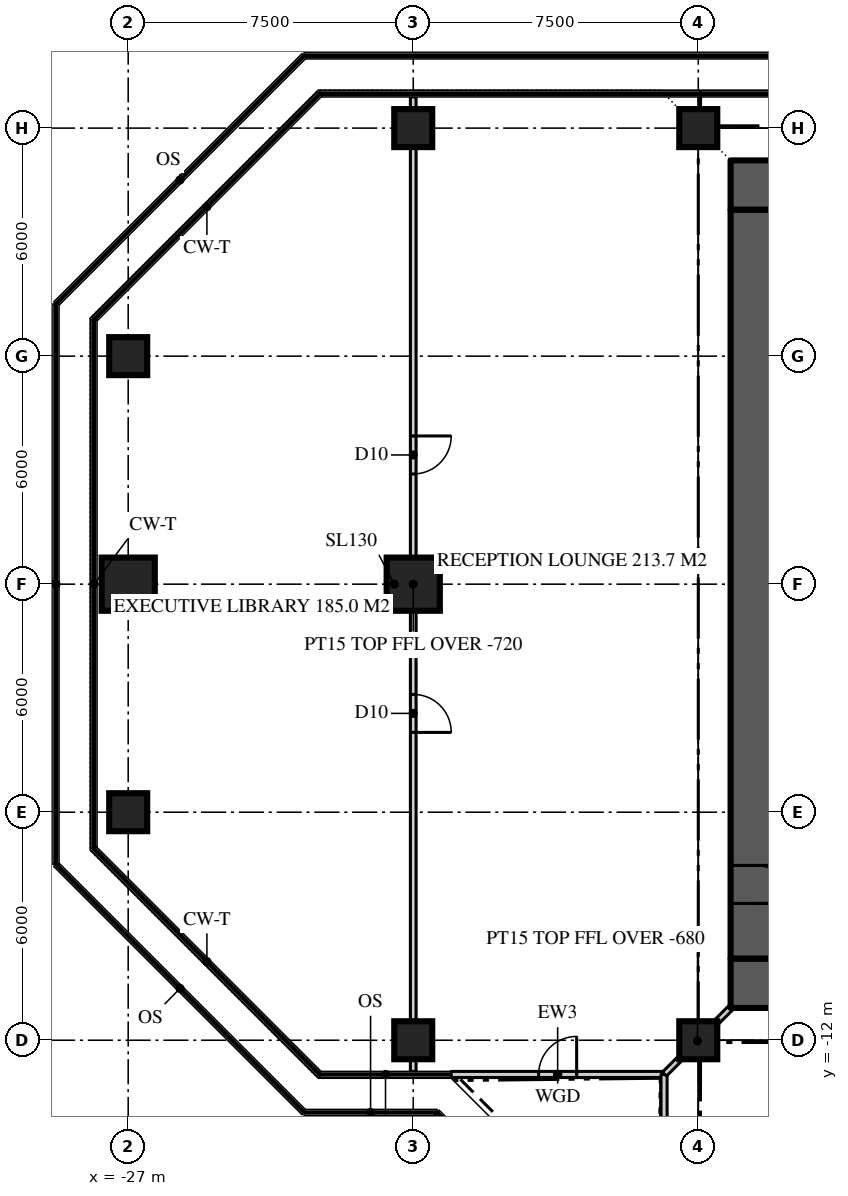
"""IFC4 building model, lengths in metres.
Left out: names, types, materials, properties, quantities, classifications, styles, units other than length and angle.
Written with IfcOpenShell. Run it as: python <this file> out.ifc"""

import sys

from ifc_helpers import new_model, si_unit, direction, frame, frame_2d, origin, origin_2d, place, context, subcontext, project, spatial, rectangle, extrude, element, fill, save


model = new_model("IFC4")
c1 = context("Model", 3, precision=1e-05, world=origin(), true_north=direction((0.0, 1.0)))
c2 = subcontext(c1, "Body", "Model", "MODEL_VIEW")
j1 = project(units=[si_unit("LENGTHUNIT", "METRE"), si_unit("PLANEANGLEUNIT", "RADIAN")], contexts=[c1])
p1 = place(None, origin())
s1 = spatial("IfcSite", under=j1, at=p1, CompositionType="ELEMENT")
p2 = place(p1, origin())
s2 = spatial("IfcBuilding", under=s1, at=p2, CompositionType="ELEMENT")
p3 = place(p2, frame((0.0, 0.0, 298.5)))
s3 = spatial("IfcBuildingStorey", under=s2, at=p3, CompositionType="ELEMENT", Elevation=298.5)
p4 = place(p3, frame((-11.15, 10.5, 0.0), z_axis=(0.0, 0.0, 1.0), x_axis=(1.0, 0.0, 0.0)))
e1 = element("IfcWall", 1, at=p4, inside=s3, PredefinedType="SHEAR", context=c2, shape_type="SweptSolid", body=[
    extrude(rectangle(XDim=22.3, YDim=1.3, at=frame_2d((11.15, 0.0))), origin(), (0.0, 0.0, 1.0), 3.9),
])
p5 = place(p4, frame((4.25, 0.0, 0.0)))
e2 = element("IfcOpeningElement", 2, at=p5, cuts=e1, PredefinedType="OPENING", context=c2, shape_type="SweptSolid", body=[
    extrude(rectangle(XDim=1.8, YDim=2.2, at=frame_2d((0.9, 1.1))), frame((0.0, 0.66, 0.0), z_axis=(0.0, -1.0, 0.0), x_axis=(1.0, 0.0, 0.0)), (0.0, 0.0, 1.0), 1.32),
])
p6 = place(p4, frame((16.25, 0.0, 0.0)))
e3 = element("IfcOpeningElement", 3, at=p6, cuts=e1, PredefinedType="OPENING", context=c2, shape_type="SweptSolid", body=[
    extrude(rectangle(XDim=1.8, YDim=2.2, at=frame_2d((0.9, 1.1))), frame((0.0, 0.66, 0.0), z_axis=(0.0, -1.0, 0.0), x_axis=(1.0, 0.0, 0.0)), (0.0, 0.0, 1.0), 1.32),
])
p7 = place(p3, frame((11.15, -10.5, 0.0), z_axis=(0.0, 0.0, 1.0), x_axis=(-1.0, 0.0, 0.0)))
e4 = element("IfcWall", 4, at=p7, inside=s3, PredefinedType="SHEAR", context=c2, shape_type="SweptSolid", body=[
    extrude(rectangle(XDim=22.3, YDim=1.3, at=frame_2d((11.15, 0.0))), origin(), (0.0, 0.0, 1.0), 3.9),
])
p8 = place(p7, frame((16.25, 0.0, 0.0)))
e5 = element("IfcOpeningElement", 5, at=p8, cuts=e4, PredefinedType="OPENING", context=c2, shape_type="SweptSolid", body=[
    extrude(rectangle(XDim=1.8, YDim=2.2, at=frame_2d((0.9, 1.1))), frame((0.0, 0.66, 0.0), z_axis=(0.0, -1.0, 0.0), x_axis=(1.0, 0.0, 0.0)), (0.0, 0.0, 1.0), 1.32),
])
p9 = place(p7, frame((4.25, 0.0, 0.0)))
e6 = element("IfcOpeningElement", 6, at=p9, cuts=e4, PredefinedType="OPENING", context=c2, shape_type="SweptSolid", body=[
    extrude(rectangle(XDim=1.8, YDim=2.2, at=frame_2d((0.9, 1.1))), frame((0.0, 0.66, 0.0), z_axis=(0.0, -1.0, 0.0), x_axis=(1.0, 0.0, 0.0)), (0.0, 0.0, 1.0), 1.32),
])
p10 = place(p3, frame((-10.5, 9.85, 0.0), z_axis=(0.0, 0.0, 1.0), x_axis=(0.0, -1.0, 0.0)))
e7 = element("IfcWall", 7, at=p10, inside=s3, PredefinedType="SHEAR", context=c2, shape_type="SweptSolid", body=[
    extrude(rectangle(XDim=19.7, YDim=1.3, at=frame_2d((9.85, 0.0))), origin(), (0.0, 0.0, 1.0), 3.9),
])
p11 = place(p10, frame((17.25, 0.0, 0.0)))
e8 = element("IfcOpeningElement", 8, at=p11, cuts=e7, PredefinedType="OPENING", context=c2, shape_type="SweptSolid", body=[
    extrude(rectangle(XDim=1.0, YDim=2.2, at=frame_2d((0.5, 1.1))), frame((0.0, 0.66, 0.0), z_axis=(0.0, -1.0, 0.0), x_axis=(1.0, 0.0, 0.0)), (0.0, 0.0, 1.0), 1.32),
])
for number, where, z_axis, x_axis in (
    (9, (-19.5, -12.0, 0.0), (0.0, 0.0, 1.0), (1.0, 0.0, 0.0)),
    (10, (-12.0, -12.0, 0.0), (0.0, 0.0, 1.0), (1.0, 0.0, 0.0)),
    (11, (-27.0, -6.0, 0.0), (0.0, 0.0, 1.0), (1.0, 0.0, 0.0)),
):
    element("IfcColumn", number, at=place(p3, frame(where, z_axis=z_axis, x_axis=x_axis)), inside=s3, PredefinedType="COLUMN", context=c2, shape_type="SweptSolid", body=[
        extrude(rectangle(XDim=1.0, YDim=1.0, at=origin_2d()), origin(), (0.0, 0.0, 1.0), 3.9),
    ])
for number, where, z_axis, x_axis in (
    (12, (-27.0, 0.0, 0.0), (0.0, 0.0, 1.0), (1.0, 0.0, 0.0)),
    (13, (-19.5, 0.0, 0.0), (0.0, 0.0, 1.0), (1.0, 0.0, 0.0)),
):
    element("IfcColumn", number, at=place(p3, frame(where, z_axis=z_axis, x_axis=x_axis)), inside=s3, PredefinedType="COLUMN", context=c2, shape_type="SweptSolid", body=[
        extrude(rectangle(XDim=1.4, YDim=1.4, at=origin_2d()), origin(), (0.0, 0.0, 1.0), 3.9),
    ])
for number, where, z_axis, x_axis in (
    (14, (-27.0, 6.0, 0.0), (0.0, 0.0, 1.0), (1.0, 0.0, 0.0)),
    (15, (-19.5, 12.0, 0.0), (0.0, 0.0, 1.0), (1.0, 0.0, 0.0)),
    (16, (-12.0, 12.0, 0.0), (0.0, 0.0, 1.0), (1.0, 0.0, 0.0)),
):
    element("IfcColumn", number, at=place(p3, frame(where, z_axis=z_axis, x_axis=x_axis)), inside=s3, PredefinedType="COLUMN", context=c2, shape_type="SweptSolid", body=[
        extrude(rectangle(XDim=1.0, YDim=1.0, at=origin_2d()), origin(), (0.0, 0.0, 1.0), 3.9),
    ])
p12 = place(p3, frame((-18.5, -12.9, 0.0), z_axis=(0.0, 0.0, 1.0), x_axis=(1.0, 0.0, 0.0)))
e17 = element("IfcWall", 17, at=p12, inside=s3, PredefinedType="SOLIDWALL", context=c2, shape_type="SweptSolid", body=[
    extrude(rectangle(XDim=5.6, YDim=0.16, at=frame_2d((2.8, 0.0))), origin(), (0.0, 0.0, 1.0), 3.77),
])
p13 = place(p12, frame((2.3, 0.0, 0.0)))
e18 = element("IfcOpeningElement", 18, at=p13, cuts=e17, PredefinedType="OPENING", context=c2, shape_type="SweptSolid", body=[
    extrude(rectangle(XDim=1.0, YDim=2.2, at=frame_2d((0.5, 1.1))), frame((0.0, 0.09, 0.0), z_axis=(0.0, -1.0, 0.0), x_axis=(1.0, 0.0, 0.0)), (0.0, 0.0, 1.0), 0.18),
])
p14 = place(p3, frame((-12.9, -12.9, 0.0), z_axis=(0.0, 0.0, 1.0), x_axis=(0.0, -1.0, 0.0)))
e19 = element("IfcWall", 19, at=p14, inside=s3, PredefinedType="SOLIDWALL", context=c2, shape_type="SweptSolid", body=[
    extrude(rectangle(XDim=5.6, YDim=0.16, at=frame_2d((2.8, 0.0))), origin(), (0.0, 0.0, 1.0), 3.77),
])
p15 = place(p3, frame((-19.5, 12.82, 0.0), z_axis=(0.0, 0.0, 1.0), x_axis=(0.0, -1.0, 0.0)))
e20 = element("IfcWall", 20, at=p15, inside=s3, PredefinedType="PARTITIONING", context=c2, shape_type="SweptSolid", body=[
    extrude(rectangle(XDim=25.64, YDim=0.15, at=frame_2d((12.82, 0.0))), origin(), (0.0, 0.0, 1.0), 3.18),
])
p16 = place(p15, frame((15.72, 0.0, 0.0)))
e21 = element("IfcOpeningElement", 21, at=p16, cuts=e20, PredefinedType="OPENING", context=c2, shape_type="SweptSolid", body=[
    extrude(rectangle(XDim=1.0, YDim=2.2, at=frame_2d((0.5, 1.1))), frame((0.0, 0.085, 0.0), z_axis=(0.0, -1.0, 0.0), x_axis=(1.0, 0.0, 0.0)), (0.0, 0.0, 1.0), 0.17),
])
p17 = place(p15, frame((8.92, 0.0, 0.0)))
e22 = element("IfcOpeningElement", 22, at=p17, cuts=e20, PredefinedType="OPENING", context=c2, shape_type="SweptSolid", body=[
    extrude(rectangle(XDim=1.0, YDim=2.2, at=frame_2d((0.5, 1.1))), frame((0.0, 0.085, 0.0), z_axis=(0.0, -1.0, 0.0), x_axis=(1.0, 0.0, 0.0)), (0.0, 0.0, 1.0), 0.17),
])
p18 = place(p3, frame((-11.15, -11.15, 0.0), z_axis=(0.0, 0.0, 1.0), x_axis=(-0.707106781187, -0.707106781187, 0.0)))
e23 = element("IfcWall", 23, at=p18, inside=s3, PredefinedType="PARTITIONING", context=c2, shape_type="SweptSolid", body=[
    extrude(rectangle(XDim=2.461, YDim=0.15, at=frame_2d((1.23, 0.0))), origin(), (0.0, 0.0, 1.0), 3.22),
])
p19 = place(p13, origin())
e24 = element("IfcDoor", 24, at=p19, inside=s3, OperationType="SINGLE_SWING_RIGHT", PredefinedType="DOOR", context=c2, shape_type="SweptSolid", body=[
    extrude(rectangle(XDim=1.0, YDim=2.2, at=frame_2d((0.5, 1.1))), frame((0.0, 0.025, 0.0), z_axis=(0.0, -1.0, 0.0), x_axis=(1.0, 0.0, 0.0)), (0.0, 0.0, 1.0), 0.05),
])
fill(e18, e24)
p20 = place(p11, origin())
e25 = element("IfcDoor", 25, at=p20, inside=s3, OperationType="SINGLE_SWING_RIGHT", PredefinedType="DOOR", context=c2, shape_type="SweptSolid", body=[
    extrude(rectangle(XDim=1.0, YDim=2.2, at=frame_2d((0.5, 1.1))), frame((0.0, 0.025, 0.0), z_axis=(0.0, -1.0, 0.0), x_axis=(1.0, 0.0, 0.0)), (0.0, 0.0, 1.0), 0.05),
])
fill(e8, e25)
p21 = place(p16, origin())
e26 = element("IfcDoor", 26, at=p21, inside=s3, OperationType="SINGLE_SWING_RIGHT", PredefinedType="DOOR", context=c2, shape_type="SweptSolid", body=[
    extrude(rectangle(XDim=1.0, YDim=2.2, at=frame_2d((0.5, 1.1))), frame((0.0, 0.025, 0.0), z_axis=(0.0, -1.0, 0.0), x_axis=(1.0, 0.0, 0.0)), (0.0, 0.0, 1.0), 0.05),
])
fill(e21, e26)
p22 = place(p17, origin())
e27 = element("IfcDoor", 27, at=p22, inside=s3, OperationType="SINGLE_SWING_LEFT", PredefinedType="DOOR", context=c2, shape_type="SweptSolid", body=[
    extrude(rectangle(XDim=1.0, YDim=2.2, at=frame_2d((0.5, 1.1))), frame((0.0, 0.025, 0.0), z_axis=(0.0, -1.0, 0.0), x_axis=(1.0, 0.0, 0.0)), (0.0, 0.0, 1.0), 0.05),
])
fill(e22, e27)
save(model, sys.argv[1])
